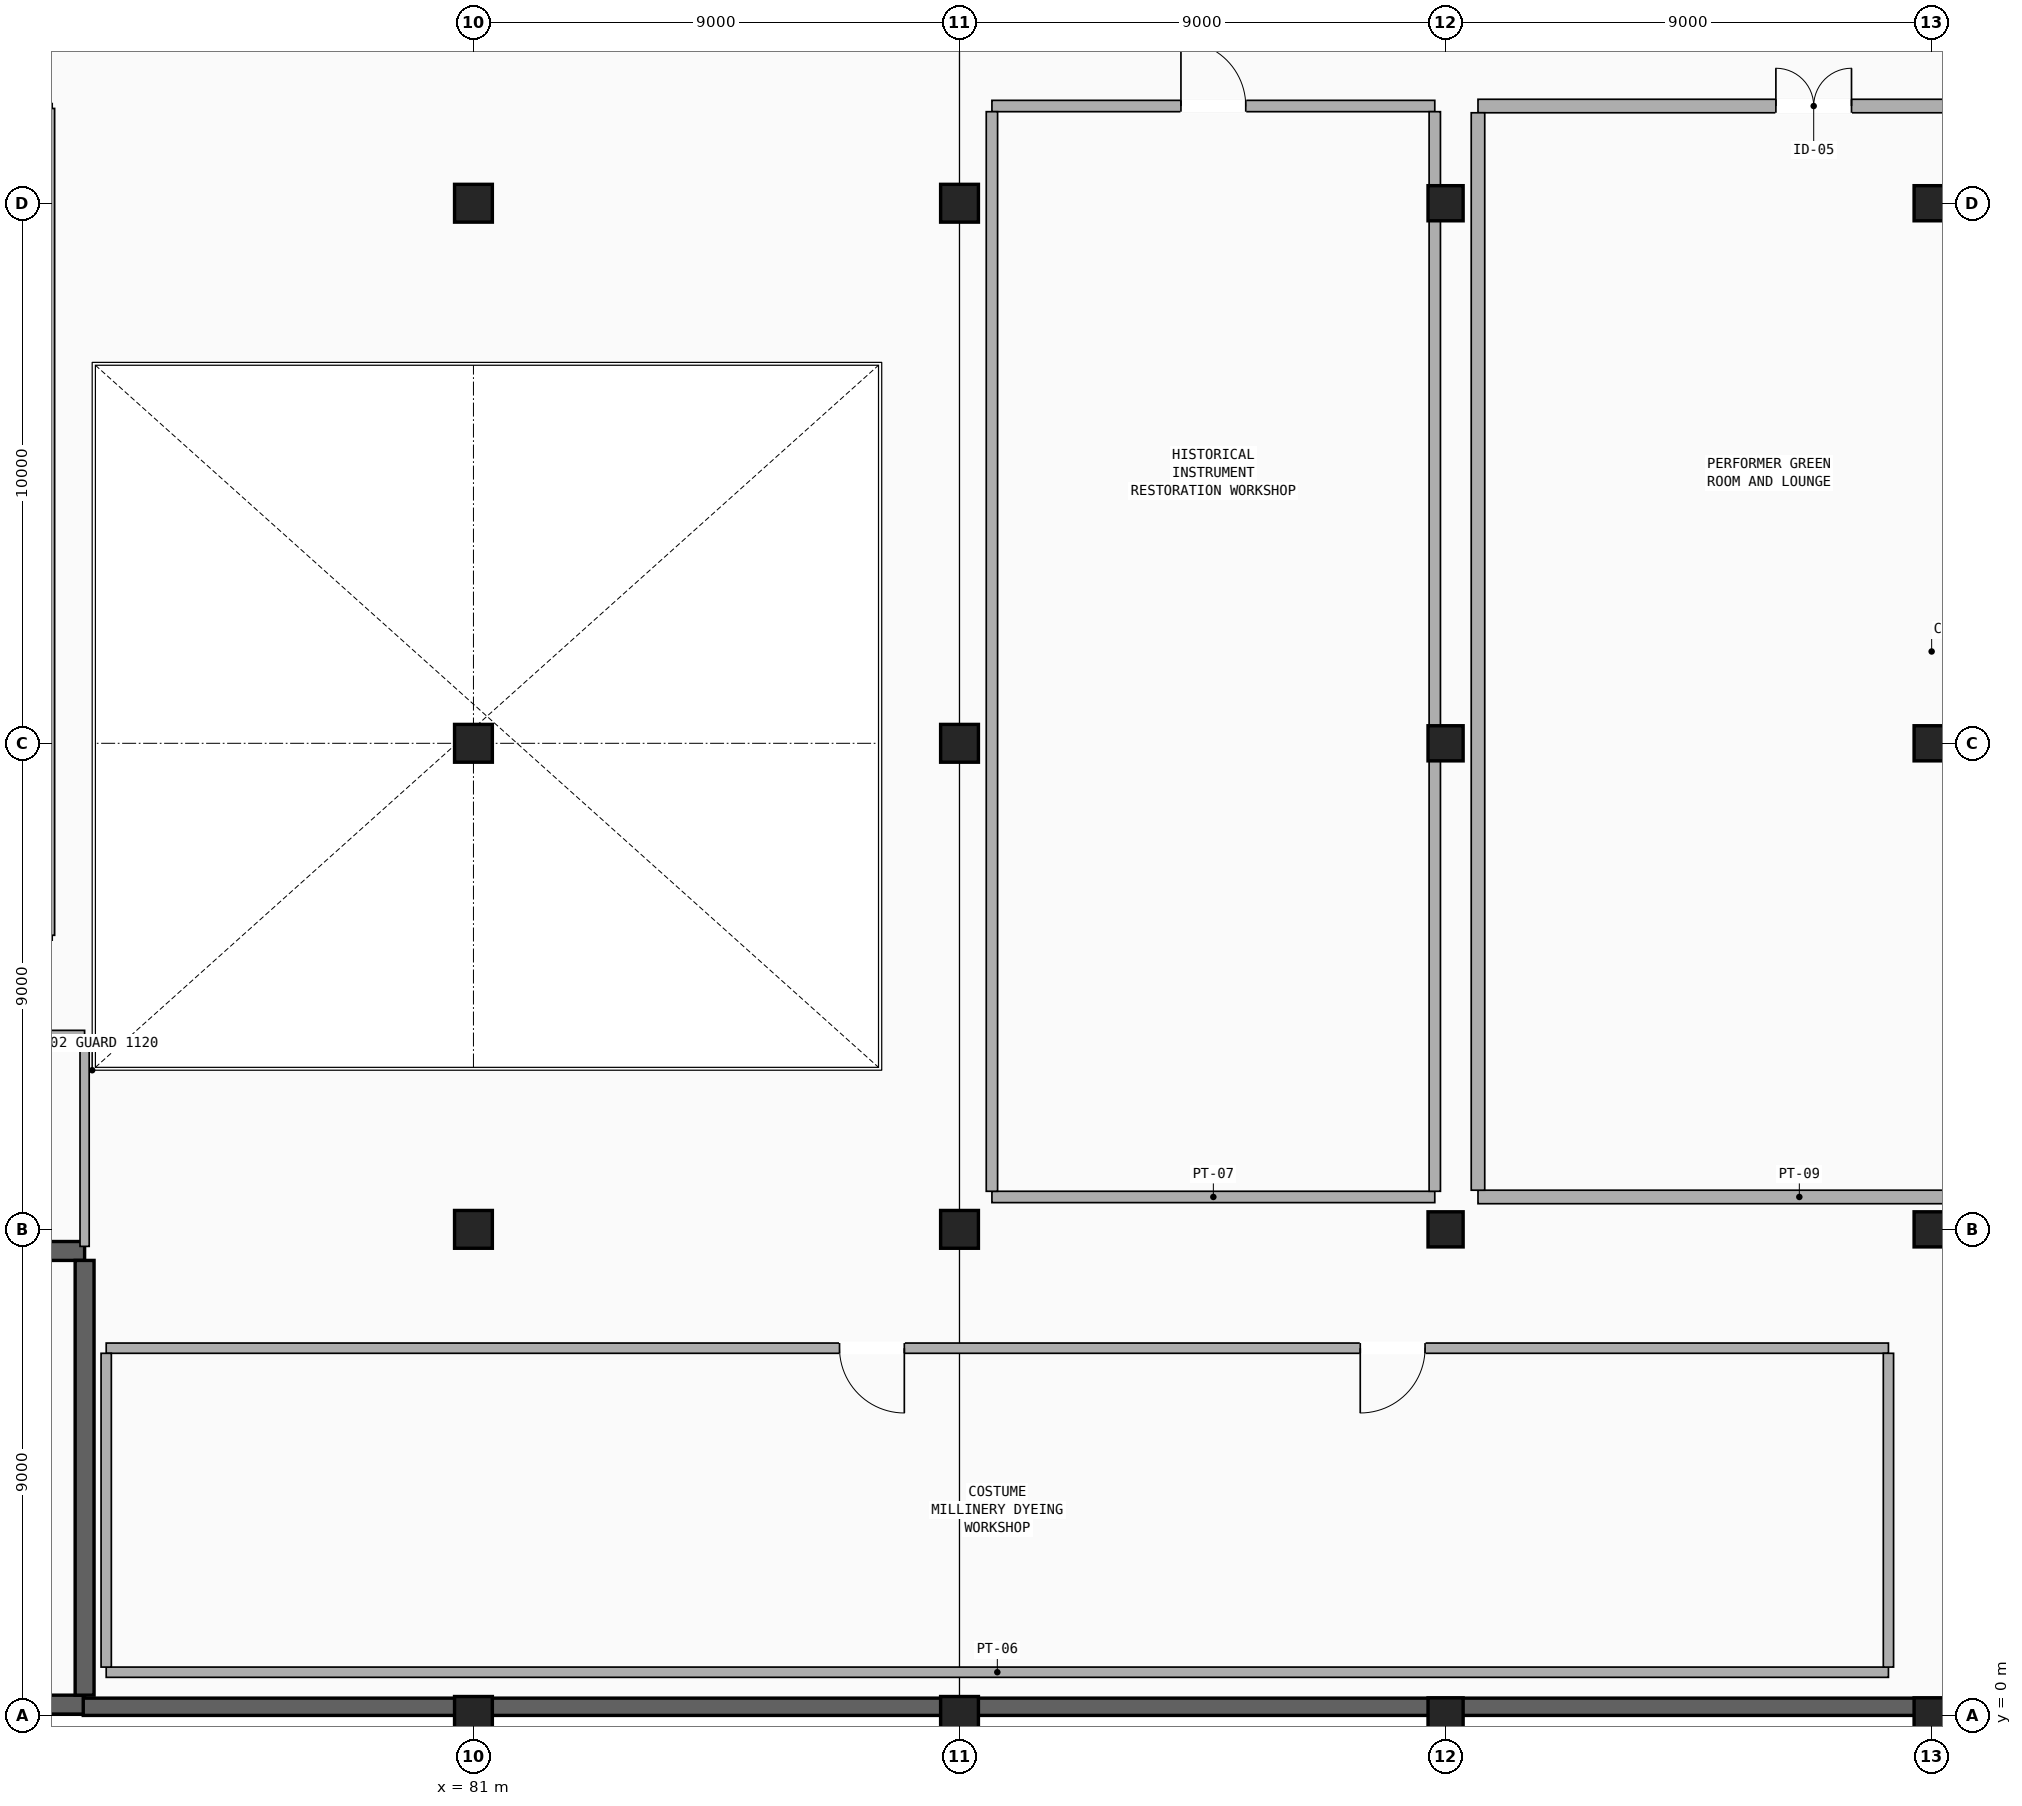
"""IFC4 building model, lengths in metres.
Left out: names, types, materials, properties, quantities, classifications, styles, units other than length and angle.
Written with IfcOpenShell. Run it as: python <this file> out.ifc"""

import sys

from ifc_helpers import new_model, si_unit, direction, frame, frame_2d, origin, origin_2d, place, context, subcontext, project, spatial, rectangle, extrude, element, fill, save


model = new_model("IFC4")
c1 = context("Model", 3, precision=1e-05, world=origin(), true_north=direction((0.0, 1.0)))
c2 = subcontext(c1, "Body", "Model", "MODEL_VIEW")
j1 = project(units=[si_unit("LENGTHUNIT", "METRE"), si_unit("PLANEANGLEUNIT", "RADIAN")], contexts=[c1])
p1 = place(None, origin())
s1 = spatial("IfcSite", under=j1, at=p1, CompositionType="ELEMENT")
p2 = place(p1, origin())
s2 = spatial("IfcBuilding", under=s1, at=p2, CompositionType="ELEMENT")
p3 = place(p2, frame((0.0, 0.0, 5.1)))
s3 = spatial("IfcBuildingStorey", under=s2, at=p3, CompositionType="ELEMENT", Elevation=5.1)
for number, where, z_axis, x_axis in (
    (1, (81.0, 0.0, 0.0), (0.0, 0.0, 1.0), (1.0, 0.0, 0.0)),
    (2, (81.0, 9.0, 0.0), (0.0, 0.0, 1.0), (1.0, 0.0, 0.0)),
    (3, (81.0, 18.0, 0.0), (0.0, 0.0, 1.0), (1.0, 0.0, 0.0)),
    (4, (81.0, 28.0, 0.0), (0.0, 0.0, 1.0), (1.0, 0.0, 0.0)),
    (5, (90.0, 0.0, 0.0), (0.0, 0.0, 1.0), (1.0, 0.0, 0.0)),
    (6, (90.0, 9.0, 0.0), (0.0, 0.0, 1.0), (1.0, 0.0, 0.0)),
    (7, (90.0, 18.0, 0.0), (0.0, 0.0, 1.0), (1.0, 0.0, 0.0)),
    (8, (90.0, 28.0, 0.0), (0.0, 0.0, 1.0), (1.0, 0.0, 0.0)),
):
    element("IfcColumn", number, at=place(p3, frame(where, z_axis=z_axis, x_axis=x_axis)), inside=s3, PredefinedType="COLUMN", context=c2, shape_type="SweptSolid", body=[
        extrude(rectangle(XDim=0.7, YDim=0.7, at=origin_2d()), origin(), (0.0, 0.0, 1.0), 4.42),
    ])
for number, where, z_axis, x_axis in (
    (9, (99.0, 0.0, 0.0), (0.0, 0.0, 1.0), (1.0, 0.0, 0.0)),
    (10, (99.0, 9.0, 0.0), (0.0, 0.0, 1.0), (1.0, 0.0, 0.0)),
    (11, (99.0, 18.0, 0.0), (0.0, 0.0, 1.0), (1.0, 0.0, 0.0)),
    (12, (99.0, 28.0, 0.0), (0.0, 0.0, 1.0), (1.0, 0.0, 0.0)),
    (13, (108.0, 0.0, 0.0), (0.0, 0.0, 1.0), (1.0, 0.0, 0.0)),
    (14, (108.0, 9.0, 0.0), (0.0, 0.0, 1.0), (1.0, 0.0, 0.0)),
    (15, (108.0, 18.0, 0.0), (0.0, 0.0, 1.0), (1.0, 0.0, 0.0)),
    (16, (108.0, 28.0, 0.0), (0.0, 0.0, 1.0), (1.0, 0.0, 0.0)),
):
    element("IfcColumn", number, at=place(p3, frame(where, z_axis=z_axis, x_axis=x_axis)), inside=s3, PredefinedType="COLUMN", context=c2, shape_type="SweptSolid", body=[
        extrude(rectangle(XDim=0.65, YDim=0.65, at=origin_2d()), origin(), (0.0, 0.0, 1.0), 4.42),
    ])
p4 = place(p3, frame((63.5, 0.2, 0.0), z_axis=(0.0, 0.0, 1.0), x_axis=(1.0, 0.0, 0.0)))
e17 = element("IfcWall", 17, at=p4, inside=s3, PredefinedType="SHEAR", context=c2, shape_type="SweptSolid", body=[
    extrude(rectangle(XDim=10.3, YDim=0.35, at=frame_2d((5.15, 0.0))), origin(), (0.0, 0.0, 1.0), 4.42),
])
p5 = place(p3, frame((63.5, 8.6, 0.0), z_axis=(0.0, 0.0, 1.0), x_axis=(1.0, 0.0, 0.0)))
e18 = element("IfcWall", 18, at=p5, inside=s3, PredefinedType="SHEAR", context=c2, shape_type="SweptSolid", body=[
    extrude(rectangle(XDim=10.3, YDim=0.35, at=frame_2d((5.15, 0.0))), origin(), (0.0, 0.0, 1.0), 4.42),
])
p6 = place(p5, frame((0.45, 0.0, 0.0)))
e19 = element("IfcOpeningElement", 19, at=p6, cuts=e18, PredefinedType="OPENING", context=c2, shape_type="SweptSolid", body=[
    extrude(rectangle(XDim=1.1, YDim=2.2, at=frame_2d((0.55, 1.1))), frame((0.0, 0.185, 0.0), z_axis=(0.0, -1.0, 0.0), x_axis=(1.0, 0.0, 0.0)), (0.0, 0.0, 1.0), 0.37),
])
p7 = place(p3, frame((73.8, 0.375, 0.0), z_axis=(0.0, 0.0, 1.0), x_axis=(0.0, 1.0, 0.0)))
e20 = element("IfcWall", 20, at=p7, inside=s3, PredefinedType="SHEAR", context=c2, shape_type="SweptSolid", body=[
    extrude(rectangle(XDim=8.05, YDim=0.35, at=frame_2d((4.025, 0.0))), origin(), (0.0, 0.0, 1.0), 4.42),
])
p8 = place(p3, frame((73.775, 0.16, 0.0), z_axis=(0.0, 0.0, 1.0), x_axis=(1.0, 0.0, 0.0)))
e21 = element("IfcWall", 21, at=p8, inside=s3, PredefinedType="SHEAR", context=c2, shape_type="SweptSolid", body=[
    extrude(rectangle(XDim=89.875, YDim=0.32, at=frame_2d((44.938, 0.0))), origin(), (0.0, 0.0, 1.0), 4.42),
])
p9 = place(p3, frame((63.5, 12.6, 0.0), z_axis=(0.0, 0.0, 1.0), x_axis=(1.0, 0.0, 0.0)))
e22 = element("IfcWall", 22, at=p9, inside=s3, PredefinedType="PARTITIONING", context=c2, shape_type="SweptSolid", body=[
    extrude(rectangle(XDim=10.3, YDim=0.17, at=frame_2d((5.15, 0.0))), origin(), (0.0, 0.0, 1.0), 3.44),
])
p10 = place(p9, frame((4.45, 0.0, 0.0)))
e23 = element("IfcOpeningElement", 23, at=p10, cuts=e22, PredefinedType="OPENING", context=c2, shape_type="SweptSolid", body=[
    extrude(rectangle(XDim=1.4, YDim=2.2, at=frame_2d((0.7, 1.1))), frame((0.0, 0.095, 0.0), z_axis=(0.0, -1.0, 0.0), x_axis=(1.0, 0.0, 0.0)), (0.0, 0.0, 1.0), 0.19),
])
p11 = place(p3, frame((73.8, 8.685, 0.0), z_axis=(0.0, 0.0, 1.0), x_axis=(0.0, 1.0, 0.0)))
e24 = element("IfcWall", 24, at=p11, inside=s3, PredefinedType="PARTITIONING", context=c2, shape_type="SweptSolid", body=[
    extrude(rectangle(XDim=3.83, YDim=0.17, at=frame_2d((1.915, 0.0))), origin(), (0.0, 0.0, 1.0), 3.14),
])
p12 = place(p3, frame((99.6, 9.6, 0.0), z_axis=(0.0, 0.0, 1.0), x_axis=(1.0, 0.0, 0.0)))
e25 = element("IfcWall", 25, at=p12, inside=s3, PredefinedType="PARTITIONING", context=c2, shape_type="SweptSolid", body=[
    extrude(rectangle(XDim=16.8, YDim=0.25, at=frame_2d((8.4, 0.0))), origin(), (0.0, 0.0, 1.0), 3.49),
])
p13 = place(p3, frame((99.6, 29.8, 0.0), z_axis=(0.0, 0.0, 1.0), x_axis=(1.0, 0.0, 0.0)))
e26 = element("IfcWall", 26, at=p13, inside=s3, PredefinedType="PARTITIONING", context=c2, shape_type="SweptSolid", body=[
    extrude(rectangle(XDim=16.8, YDim=0.25, at=frame_2d((8.4, 0.0))), origin(), (0.0, 0.0, 1.0), 3.44),
])
p14 = place(p13, frame((5.516, 0.0, 0.0)))
e27 = element("IfcOpeningElement", 27, at=p14, cuts=e26, PredefinedType="OPENING", context=c2, shape_type="SweptSolid", body=[
    extrude(rectangle(XDim=1.4, YDim=2.2, at=frame_2d((0.7, 1.1))), frame((0.0, 0.135, 0.0), z_axis=(0.0, -1.0, 0.0), x_axis=(1.0, 0.0, 0.0)), (0.0, 0.0, 1.0), 0.27),
])
p15 = place(p13, frame((11.032, 0.0, 0.0)))
e28 = element("IfcOpeningElement", 28, at=p15, cuts=e26, PredefinedType="OPENING", context=c2, shape_type="SweptSolid", body=[
    extrude(rectangle(XDim=1.4, YDim=2.2, at=frame_2d((0.7, 1.1))), frame((0.0, 0.135, 0.0), z_axis=(0.0, -1.0, 0.0), x_axis=(1.0, 0.0, 0.0)), (0.0, 0.0, 1.0), 0.27),
])
p16 = place(p3, frame((99.6, 9.725, 0.0), z_axis=(0.0, 0.0, 1.0), x_axis=(0.0, 1.0, 0.0)))
e29 = element("IfcWall", 29, at=p16, inside=s3, PredefinedType="PARTITIONING", context=c2, shape_type="SweptSolid", body=[
    extrude(rectangle(XDim=19.95, YDim=0.25, at=frame_2d((9.975, 0.0))), origin(), (0.0, 0.0, 1.0), 3.14),
])
p17 = place(p3, frame((73.2, 14.445, 0.0), z_axis=(0.0, 0.0, 1.0), x_axis=(0.0, 1.0, 0.0)))
e30 = element("IfcWall", 30, at=p17, inside=s3, PredefinedType="PARTITIONING", context=c2, shape_type="SweptSolid", body=[
    extrude(rectangle(XDim=15.31, YDim=0.09, at=frame_2d((7.655, 0.0))), origin(), (0.0, 0.0, 1.0), 3.24),
])
p18 = place(p3, frame((74.2, 0.8, 0.0), z_axis=(0.0, 0.0, 1.0), x_axis=(1.0, 0.0, 0.0)))
e31 = element("IfcWall", 31, at=p18, inside=s3, PredefinedType="PARTITIONING", context=c2, shape_type="SweptSolid", body=[
    extrude(rectangle(XDim=33.0, YDim=0.19, at=frame_2d((16.5, 0.0))), origin(), (0.0, 0.0, 1.0), 3.46),
])
p19 = place(p3, frame((74.2, 6.8, 0.0), z_axis=(0.0, 0.0, 1.0), x_axis=(1.0, 0.0, 0.0)))
e32 = element("IfcWall", 32, at=p19, inside=s3, PredefinedType="PARTITIONING", context=c2, shape_type="SweptSolid", body=[
    extrude(rectangle(XDim=33.0, YDim=0.19, at=frame_2d((16.5, 0.0))), origin(), (0.0, 0.0, 1.0), 3.46),
])
p20 = place(p19, frame((13.578, 0.0, 0.0)))
e33 = element("IfcOpeningElement", 33, at=p20, cuts=e32, PredefinedType="OPENING", context=c2, shape_type="SweptSolid", body=[
    extrude(rectangle(XDim=1.2, YDim=2.2, at=frame_2d((0.6, 1.1))), frame((0.0, 0.105, 0.0), z_axis=(0.0, -1.0, 0.0), x_axis=(1.0, 0.0, 0.0)), (0.0, 0.0, 1.0), 0.21),
])
p21 = place(p19, frame((23.22, 0.0, 0.0)))
e34 = element("IfcOpeningElement", 34, at=p21, cuts=e32, PredefinedType="OPENING", context=c2, shape_type="SweptSolid", body=[
    extrude(rectangle(XDim=1.2, YDim=2.2, at=frame_2d((0.6, 1.1))), frame((0.0, 0.105, 0.0), z_axis=(0.0, -1.0, 0.0), x_axis=(1.0, 0.0, 0.0)), (0.0, 0.0, 1.0), 0.21),
])
p22 = place(p3, frame((74.2, 0.895, 0.0), z_axis=(0.0, 0.0, 1.0), x_axis=(0.0, 1.0, 0.0)))
e35 = element("IfcWall", 35, at=p22, inside=s3, PredefinedType="PARTITIONING", context=c2, shape_type="SweptSolid", body=[
    extrude(rectangle(XDim=5.81, YDim=0.19, at=frame_2d((2.905, 0.0))), origin(), (0.0, 0.0, 1.0), 4.16),
])
p23 = place(p3, frame((107.2, 0.895, 0.0), z_axis=(0.0, 0.0, 1.0), x_axis=(0.0, 1.0, 0.0)))
e36 = element("IfcWall", 36, at=p23, inside=s3, PredefinedType="PARTITIONING", context=c2, shape_type="SweptSolid", body=[
    extrude(rectangle(XDim=5.81, YDim=0.19, at=frame_2d((2.905, 0.0))), origin(), (0.0, 0.0, 1.0), 3.733),
])
p24 = place(p3, frame((90.6, 9.6, 0.0), z_axis=(0.0, 0.0, 1.0), x_axis=(1.0, 0.0, 0.0)))
e37 = element("IfcWall", 37, at=p24, inside=s3, PredefinedType="PARTITIONING", context=c2, shape_type="SweptSolid", body=[
    extrude(rectangle(XDim=8.2, YDim=0.21, at=frame_2d((4.1, 0.0))), origin(), (0.0, 0.0, 1.0), 3.49),
])
p25 = place(p3, frame((90.6, 29.8, 0.0), z_axis=(0.0, 0.0, 1.0), x_axis=(1.0, 0.0, 0.0)))
e38 = element("IfcWall", 38, at=p25, inside=s3, PredefinedType="PARTITIONING", context=c2, shape_type="SweptSolid", body=[
    extrude(rectangle(XDim=8.2, YDim=0.21, at=frame_2d((4.1, 0.0))), origin(), (0.0, 0.0, 1.0), 3.44),
])
p26 = place(p25, frame((3.5, 0.0, 0.0)))
e39 = element("IfcOpeningElement", 39, at=p26, cuts=e38, PredefinedType="OPENING", context=c2, shape_type="SweptSolid", body=[
    extrude(rectangle(XDim=1.2, YDim=2.2, at=frame_2d((0.6, 1.1))), frame((0.0, 0.115, 0.0), z_axis=(0.0, -1.0, 0.0), x_axis=(1.0, 0.0, 0.0)), (0.0, 0.0, 1.0), 0.23),
])
p27 = place(p3, frame((90.6, 9.705, 0.0), z_axis=(0.0, 0.0, 1.0), x_axis=(0.0, 1.0, 0.0)))
e40 = element("IfcWall", 40, at=p27, inside=s3, PredefinedType="PARTITIONING", context=c2, shape_type="SweptSolid", body=[
    extrude(rectangle(XDim=19.99, YDim=0.21, at=frame_2d((9.995, 0.0))), origin(), (0.0, 0.0, 1.0), 3.24),
])
p28 = place(p3, frame((98.8, 9.705, 0.0), z_axis=(0.0, 0.0, 1.0), x_axis=(0.0, 1.0, 0.0)))
e41 = element("IfcWall", 41, at=p28, inside=s3, PredefinedType="PARTITIONING", context=c2, shape_type="SweptSolid", body=[
    extrude(rectangle(XDim=19.99, YDim=0.21, at=frame_2d((9.995, 0.0))), origin(), (0.0, 0.0, 1.0), 3.14),
])
p29 = place(p14, origin())
e42 = element("IfcDoor", 42, at=p29, inside=s3, OperationType="DOUBLE_DOOR_SINGLE_SWING", PredefinedType="DOOR", context=c2, shape_type="SweptSolid", body=[
    extrude(rectangle(XDim=1.4, YDim=2.2, at=frame_2d((0.7, 1.1))), frame((0.0, 0.025, 0.0), z_axis=(0.0, -1.0, 0.0), x_axis=(1.0, 0.0, 0.0)), (0.0, 0.0, 1.0), 0.05),
])
fill(e27, e42)
p30 = place(p20, frame((1.2, 0.0, 0.0), z_axis=(0.0, 0.0, 1.0), x_axis=(-1.0, 0.0, 0.0)))
e43 = element("IfcDoor", 43, at=p30, inside=s3, OperationType="SINGLE_SWING_LEFT", PredefinedType="DOOR", context=c2, shape_type="SweptSolid", body=[
    extrude(rectangle(XDim=1.2, YDim=2.2, at=frame_2d((0.6, 1.1))), frame((0.0, 0.025, 0.0), z_axis=(0.0, -1.0, 0.0), x_axis=(1.0, 0.0, 0.0)), (0.0, 0.0, 1.0), 0.05),
])
fill(e33, e43)
p31 = place(p21, frame((1.2, 0.0, 0.0), z_axis=(0.0, 0.0, 1.0), x_axis=(-1.0, 0.0, 0.0)))
e44 = element("IfcDoor", 44, at=p31, inside=s3, OperationType="SINGLE_SWING_RIGHT", PredefinedType="DOOR", context=c2, shape_type="SweptSolid", body=[
    extrude(rectangle(XDim=1.2, YDim=2.2, at=frame_2d((0.6, 1.1))), frame((0.0, 0.025, 0.0), z_axis=(0.0, -1.0, 0.0), x_axis=(1.0, 0.0, 0.0)), (0.0, 0.0, 1.0), 0.05),
])
fill(e34, e44)
p32 = place(p26, origin())
e45 = element("IfcDoor", 45, at=p32, inside=s3, OperationType="SINGLE_SWING_LEFT", PredefinedType="DOOR", context=c2, shape_type="SweptSolid", body=[
    extrude(rectangle(XDim=1.2, YDim=2.2, at=frame_2d((0.6, 1.1))), frame((0.0, 0.025, 0.0), z_axis=(0.0, -1.0, 0.0), x_axis=(1.0, 0.0, 0.0)), (0.0, 0.0, 1.0), 0.05),
])
fill(e39, e45)
save(model, sys.argv[1])
